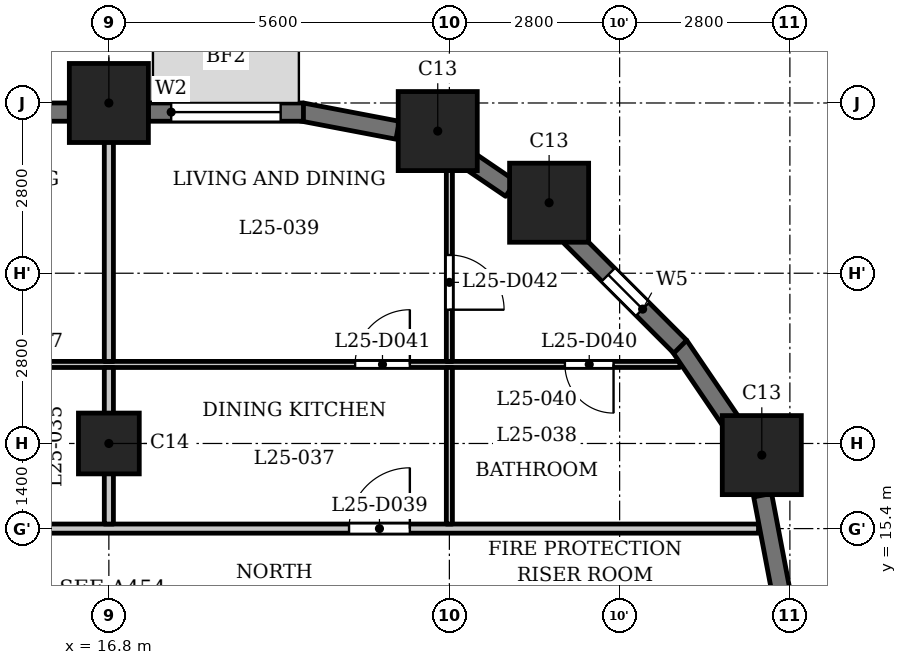
"""IFC4 building model, lengths in metres.
Left out: names, types, materials, properties, quantities, classifications, styles, units other than length and angle.
Written with IfcOpenShell. Run it as: python <this file> out.ifc"""

import sys

from ifc_helpers import new_model, si_unit, direction, frame, frame_2d, origin, origin_2d, place, context, subcontext, project, spatial, rectangle, extrude, element, fill, save


model = new_model("IFC4")
c1 = context("Model", 3, precision=1e-05, world=origin(), true_north=direction((0.0, 1.0)))
c2 = subcontext(c1, "Body", "Model", "MODEL_VIEW")
j1 = project(units=[si_unit("LENGTHUNIT", "METRE"), si_unit("PLANEANGLEUNIT", "RADIAN")], contexts=[c1])
p1 = place(None, origin())
s1 = spatial("IfcSite", under=j1, at=p1, CompositionType="ELEMENT")
p2 = place(p1, origin())
s2 = spatial("IfcBuilding", under=s1, at=p2, CompositionType="ELEMENT")
p3 = place(p2, frame((0.0, 0.0, 100.8)))
s3 = spatial("IfcBuildingStorey", under=s2, at=p3, CompositionType="ELEMENT", Elevation=100.8)
for number, where, z_axis, x_axis in (
    (1, (27.538, 16.609, 0.0), (0.0, 0.0, 1.0), (1.0, 0.0, 0.0)),
    (2, (24.04, 20.76, 0.0), (0.0, 0.0, 1.0), (1.0, 0.0, 0.0)),
    (3, (22.209, 21.938, 0.0), (0.0, 0.0, 1.0), (1.0, 0.0, 0.0)),
    (4, (16.8, 22.4, 0.0), (0.0, 0.0, 1.0), (1.0, 0.0, 0.0)),
):
    element("IfcColumn", number, at=place(p3, frame(where, z_axis=z_axis, x_axis=x_axis)), inside=s3, PredefinedType="COLUMN", context=c2, shape_type="SweptSolid", body=[
        extrude(rectangle(XDim=1.3, YDim=1.3, at=origin_2d()), origin(), (0.0, 0.0, 1.0), 3.5),
    ])
p4 = place(p3, frame((16.8, 16.8, 0.0), z_axis=(0.0, 0.0, 1.0), x_axis=(1.0, 0.0, 0.0)))
e5 = element("IfcColumn", 5, at=p4, inside=s3, PredefinedType="COLUMN", context=c2, shape_type="SweptSolid", body=[
    extrude(rectangle(XDim=1.0, YDim=1.0, at=origin_2d()), origin(), (0.0, 0.0, 1.0), 3.5),
])
for number, where, z_axis, x_axis in (
    (6, (27.853, 14.372, 0.0), (0.0, 0.0, 1.0), (-0.187, 0.982, 0.0)),
    (7, (27.082, 17.084, 0.0), (0.0, 0.0, 1.0), (-0.562, 0.827, 0.0)),
):
    element("IfcWall", number, at=place(p3, frame(where, z_axis=z_axis, x_axis=x_axis)), inside=s3, PredefinedType="SOLIDWALL", context=c2, shape_type="SweptSolid", body=[
        extrude(rectangle(XDim=1.606, YDim=0.3, at=frame_2d((0.803, 0.0))), origin(), (0.0, 0.0, 1.0), 2.4),
    ])
p5 = place(p3, frame((26.197, 18.391, 0.0), z_axis=(0.0, 0.0, 1.0), x_axis=(-0.707058908279, 0.707154650853, 0.0)))
e8 = element("IfcWall", 8, at=p5, inside=s3, PredefinedType="SOLIDWALL", context=c2, shape_type="SweptSolid", body=[
    extrude(rectangle(XDim=2.55, YDim=0.3, at=frame_2d((1.275, 0.0))), origin(), (0.0, 0.0, 1.0), 2.4),
])
p6 = place(p5, frame((0.875, 0.0, 0.6)))
e9 = element("IfcOpeningElement", 9, at=p6, cuts=e8, PredefinedType="OPENING", context=c2, shape_type="SweptSolid", body=[
    extrude(rectangle(XDim=0.8, YDim=1.55, at=frame_2d((0.4, 0.775))), frame((0.0, 0.16, 0.0), z_axis=(0.0, -1.0, 0.0), x_axis=(1.0, 0.0, 0.0)), (0.0, 0.0, 1.0), 0.32),
])
p7 = place(p3, frame((23.41, 20.989, 0.0), z_axis=(0.0, 0.0, 1.0), x_axis=(-0.827050703543, 0.562127328787, 0.0)))
e10 = element("IfcWall", 10, at=p7, inside=s3, PredefinedType="SOLIDWALL", context=c2, shape_type="SweptSolid", body=[
    extrude(rectangle(XDim=0.877, YDim=0.3, at=frame_2d((0.438, 0.0))), origin(), (0.0, 0.0, 1.0), 3.2),
])
p8 = place(p3, frame((21.55, 21.952, 0.0), z_axis=(0.0, 0.0, 1.0), x_axis=(-0.982278644094, 0.187426426519, 0.0)))
e11 = element("IfcWall", 11, at=p8, inside=s3, PredefinedType="SOLIDWALL", context=c2, shape_type="SweptSolid", body=[
    extrude(rectangle(XDim=1.606, YDim=0.3, at=frame_2d((0.803, 0.0))), origin(), (0.0, 0.0, 1.0), 2.4),
])
p9 = place(p3, frame((20.0, 22.25, 0.0), z_axis=(0.0, 0.0, 1.0), x_axis=(-1.0, 0.0, 0.0)))
e12 = element("IfcWall", 12, at=p9, inside=s3, PredefinedType="SOLIDWALL", context=c2, shape_type="SweptSolid", body=[
    extrude(rectangle(XDim=2.55, YDim=0.3, at=frame_2d((1.275, 0.0))), origin(), (0.0, 0.0, 1.0), 2.4),
])
p10 = place(p9, frame((0.375, 0.0, 0.9)))
e13 = element("IfcOpeningElement", 13, at=p10, cuts=e12, PredefinedType="OPENING", context=c2, shape_type="SweptSolid", body=[
    extrude(rectangle(XDim=1.8, YDim=1.25, at=frame_2d((0.9, 0.625))), frame((0.0, 0.16, 0.0), z_axis=(0.0, -1.0, 0.0), x_axis=(1.0, 0.0, 0.0)), (0.0, 0.0, 1.0), 0.32),
])
p11 = place(p3, frame((16.15, 22.25, 0.0), z_axis=(0.0, 0.0, 1.0), x_axis=(-1.0, 0.0, 0.0)))
e14 = element("IfcWall", 14, at=p11, inside=s3, PredefinedType="SOLIDWALL", context=c2, shape_type="SweptSolid", body=[
    extrude(rectangle(XDim=4.3, YDim=0.3, at=frame_2d((2.15, 0.0))), origin(), (0.0, 0.0, 1.0), 2.4),
])
p12 = place(p11, frame((0.35, 0.0, 1.2)))
e15 = element("IfcOpeningElement", 15, at=p12, cuts=e14, PredefinedType="OPENING", context=c2, shape_type="SweptSolid", body=[
    extrude(rectangle(XDim=3.6, YDim=0.95, at=frame_2d((1.8, 0.475))), frame((0.0, 0.16, 0.0), z_axis=(0.0, -1.0, 0.0), x_axis=(1.0, 0.0, 0.0)), (0.0, 0.0, 1.0), 0.32),
])
p13 = place(p3, frame((-27.484, 15.4, 0.0), z_axis=(0.0, 0.0, 1.0), x_axis=(1.0, 0.0, 0.0)))
e16 = element("IfcWall", 16, at=p13, inside=s3, PredefinedType="PARTITIONING", context=c2, shape_type="SweptSolid", body=[
    extrude(rectangle(XDim=54.968, YDim=0.15, at=frame_2d((27.484, 0.0))), origin(), (0.0, 0.0, 1.0), 3.2),
])
p14 = place(p13, frame((9.034, 0.0, 0.0)))
e17 = element("IfcOpeningElement", 17, at=p14, cuts=e16, PredefinedType="OPENING", context=c2, shape_type="SweptSolid", body=[
    extrude(rectangle(XDim=1.0, YDim=2.1, at=frame_2d((0.5, 1.05))), frame((0.0, 0.085, 0.0), z_axis=(0.0, -1.0, 0.0), x_axis=(1.0, 0.0, 0.0)), (0.0, 0.0, 1.0), 0.17),
])
p15 = place(p13, frame((14.634, 0.0, 0.0)))
e18 = element("IfcOpeningElement", 18, at=p15, cuts=e16, PredefinedType="OPENING", context=c2, shape_type="SweptSolid", body=[
    extrude(rectangle(XDim=1.0, YDim=2.1, at=frame_2d((0.5, 1.05))), frame((0.0, 0.085, 0.0), z_axis=(0.0, -1.0, 0.0), x_axis=(1.0, 0.0, 0.0)), (0.0, 0.0, 1.0), 0.17),
])
p16 = place(p13, frame((19.984, 0.0, 0.0)))
e19 = element("IfcOpeningElement", 19, at=p16, cuts=e16, PredefinedType="OPENING", context=c2, shape_type="SweptSolid", body=[
    extrude(rectangle(XDim=1.0, YDim=2.1, at=frame_2d((0.5, 1.05))), frame((0.0, 0.085, 0.0), z_axis=(0.0, -1.0, 0.0), x_axis=(1.0, 0.0, 0.0)), (0.0, 0.0, 1.0), 0.17),
])
p17 = place(p13, frame((23.234, 0.0, 0.0)))
e20 = element("IfcOpeningElement", 20, at=p17, cuts=e16, PredefinedType="OPENING", context=c2, shape_type="SweptSolid", body=[
    extrude(rectangle(XDim=1.0, YDim=2.1, at=frame_2d((0.5, 1.05))), frame((0.0, 0.085, 0.0), z_axis=(0.0, -1.0, 0.0), x_axis=(1.0, 0.0, 0.0)), (0.0, 0.0, 1.0), 0.17),
])
p18 = place(p13, frame((28.184, 0.0, 0.0)))
e21 = element("IfcOpeningElement", 21, at=p18, cuts=e16, PredefinedType="OPENING", context=c2, shape_type="SweptSolid", body=[
    extrude(rectangle(XDim=1.0, YDim=2.1, at=frame_2d((0.5, 1.05))), frame((0.0, 0.085, 0.0), z_axis=(0.0, -1.0, 0.0), x_axis=(1.0, 0.0, 0.0)), (0.0, 0.0, 1.0), 0.17),
])
p19 = place(p13, frame((39.284, 0.0, 0.0)))
e22 = element("IfcOpeningElement", 22, at=p19, cuts=e16, PredefinedType="OPENING", context=c2, shape_type="SweptSolid", body=[
    extrude(rectangle(XDim=1.0, YDim=2.1, at=frame_2d((0.5, 1.05))), frame((0.0, 0.085, 0.0), z_axis=(0.0, -1.0, 0.0), x_axis=(1.0, 0.0, 0.0)), (0.0, 0.0, 1.0), 0.17),
])
p20 = place(p13, frame((48.234, 0.0, 0.0)))
e23 = element("IfcOpeningElement", 23, at=p20, cuts=e16, PredefinedType="OPENING", context=c2, shape_type="SweptSolid", body=[
    extrude(rectangle(XDim=1.0, YDim=2.1, at=frame_2d((0.5, 1.05))), frame((0.0, 0.085, 0.0), z_axis=(0.0, -1.0, 0.0), x_axis=(1.0, 0.0, 0.0)), (0.0, 0.0, 1.0), 0.17),
])
p21 = place(p3, frame((-26.44, 18.1, 0.0), z_axis=(0.0, 0.0, 1.0), x_axis=(1.0, 0.0, 0.0)))
e24 = element("IfcWall", 24, at=p21, inside=s3, PredefinedType="PARTITIONING", context=c2, shape_type="SweptSolid", body=[
    extrude(rectangle(XDim=52.63, YDim=0.1, at=frame_2d((26.315, 0.0))), origin(), (0.0, 0.0, 1.0), 3.2),
])
p22 = place(p21, frame((2.626, 0.0, 0.0)))
e25 = element("IfcOpeningElement", 25, at=p22, cuts=e24, PredefinedType="OPENING", context=c2, shape_type="SweptSolid", body=[
    extrude(rectangle(XDim=0.8, YDim=2.1, at=frame_2d((0.4, 1.05))), frame((0.0, 0.06, 0.0), z_axis=(0.0, -1.0, 0.0), x_axis=(1.0, 0.0, 0.0)), (0.0, 0.0, 1.0), 0.12),
])
p23 = place(p21, frame((8.09, 0.0, 0.0)))
e26 = element("IfcOpeningElement", 26, at=p23, cuts=e24, PredefinedType="OPENING", context=c2, shape_type="SweptSolid", body=[
    extrude(rectangle(XDim=0.9, YDim=2.1, at=frame_2d((0.45, 1.05))), frame((0.0, 0.06, 0.0), z_axis=(0.0, -1.0, 0.0), x_axis=(1.0, 0.0, 0.0)), (0.0, 0.0, 1.0), 0.12),
])
p24 = place(p21, frame((10.29, 0.0, 0.0)))
e27 = element("IfcOpeningElement", 27, at=p24, cuts=e24, PredefinedType="OPENING", context=c2, shape_type="SweptSolid", body=[
    extrude(rectangle(XDim=0.8, YDim=2.1, at=frame_2d((0.4, 1.05))), frame((0.0, 0.06, 0.0), z_axis=(0.0, -1.0, 0.0), x_axis=(1.0, 0.0, 0.0)), (0.0, 0.0, 1.0), 0.12),
])
p25 = place(p21, frame((13.69, 0.0, 0.0)))
e28 = element("IfcOpeningElement", 28, at=p25, cuts=e24, PredefinedType="OPENING", context=c2, shape_type="SweptSolid", body=[
    extrude(rectangle(XDim=0.9, YDim=2.1, at=frame_2d((0.45, 1.05))), frame((0.0, 0.06, 0.0), z_axis=(0.0, -1.0, 0.0), x_axis=(1.0, 0.0, 0.0)), (0.0, 0.0, 1.0), 0.12),
])
p26 = place(p21, frame((15.89, 0.0, 0.0)))
e29 = element("IfcOpeningElement", 29, at=p26, cuts=e24, PredefinedType="OPENING", context=c2, shape_type="SweptSolid", body=[
    extrude(rectangle(XDim=0.8, YDim=2.1, at=frame_2d((0.4, 1.05))), frame((0.0, 0.06, 0.0), z_axis=(0.0, -1.0, 0.0), x_axis=(1.0, 0.0, 0.0)), (0.0, 0.0, 1.0), 0.12),
])
p27 = place(p21, frame((19.04, 0.0, 0.0)))
e30 = element("IfcOpeningElement", 30, at=p27, cuts=e24, PredefinedType="OPENING", context=c2, shape_type="SweptSolid", body=[
    extrude(rectangle(XDim=0.9, YDim=2.1, at=frame_2d((0.45, 1.05))), frame((0.0, 0.06, 0.0), z_axis=(0.0, -1.0, 0.0), x_axis=(1.0, 0.0, 0.0)), (0.0, 0.0, 1.0), 0.12),
])
p28 = place(p21, frame((24.99, 0.0, 0.0)))
e31 = element("IfcOpeningElement", 31, at=p28, cuts=e24, PredefinedType="OPENING", context=c2, shape_type="SweptSolid", body=[
    extrude(rectangle(XDim=0.8, YDim=2.1, at=frame_2d((0.4, 1.05))), frame((0.0, 0.06, 0.0), z_axis=(0.0, -1.0, 0.0), x_axis=(1.0, 0.0, 0.0)), (0.0, 0.0, 1.0), 0.12),
])
p29 = place(p21, frame((22.29, 0.0, 0.0)))
e32 = element("IfcOpeningElement", 32, at=p29, cuts=e24, PredefinedType="OPENING", context=c2, shape_type="SweptSolid", body=[
    extrude(rectangle(XDim=0.9, YDim=2.1, at=frame_2d((0.45, 1.05))), frame((0.0, 0.06, 0.0), z_axis=(0.0, -1.0, 0.0), x_axis=(1.0, 0.0, 0.0)), (0.0, 0.0, 1.0), 0.12),
])
p30 = place(p21, frame((32.69, 0.0, 0.0)))
e33 = element("IfcOpeningElement", 33, at=p30, cuts=e24, PredefinedType="OPENING", context=c2, shape_type="SweptSolid", body=[
    extrude(rectangle(XDim=0.8, YDim=2.1, at=frame_2d((0.4, 1.05))), frame((0.0, 0.06, 0.0), z_axis=(0.0, -1.0, 0.0), x_axis=(1.0, 0.0, 0.0)), (0.0, 0.0, 1.0), 0.12),
])
p31 = place(p21, frame((26.99, 0.0, 0.0)))
e34 = element("IfcOpeningElement", 34, at=p31, cuts=e24, PredefinedType="OPENING", context=c2, shape_type="SweptSolid", body=[
    extrude(rectangle(XDim=0.9, YDim=2.1, at=frame_2d((0.45, 1.05))), frame((0.0, 0.06, 0.0), z_axis=(0.0, -1.0, 0.0), x_axis=(1.0, 0.0, 0.0)), (0.0, 0.0, 1.0), 0.12),
])
p32 = place(p21, frame((41.29, 0.0, 0.0)))
e35 = element("IfcOpeningElement", 35, at=p32, cuts=e24, PredefinedType="OPENING", context=c2, shape_type="SweptSolid", body=[
    extrude(rectangle(XDim=0.8, YDim=2.1, at=frame_2d((0.4, 1.05))), frame((0.0, 0.06, 0.0), z_axis=(0.0, -1.0, 0.0), x_axis=(1.0, 0.0, 0.0)), (0.0, 0.0, 1.0), 0.12),
])
p33 = place(p21, frame((38.34, 0.0, 0.0)))
e36 = element("IfcOpeningElement", 36, at=p33, cuts=e24, PredefinedType="OPENING", context=c2, shape_type="SweptSolid", body=[
    extrude(rectangle(XDim=0.9, YDim=2.1, at=frame_2d((0.45, 1.05))), frame((0.0, 0.06, 0.0), z_axis=(0.0, -1.0, 0.0), x_axis=(1.0, 0.0, 0.0)), (0.0, 0.0, 1.0), 0.12),
])
p34 = place(p21, frame((50.74, 0.0, 0.0)))
e37 = element("IfcOpeningElement", 37, at=p34, cuts=e24, PredefinedType="OPENING", context=c2, shape_type="SweptSolid", body=[
    extrude(rectangle(XDim=0.8, YDim=2.1, at=frame_2d((0.4, 1.05))), frame((0.0, 0.06, 0.0), z_axis=(0.0, -1.0, 0.0), x_axis=(1.0, 0.0, 0.0)), (0.0, 0.0, 1.0), 0.12),
])
p35 = place(p21, frame((47.29, 0.0, 0.0)))
e38 = element("IfcOpeningElement", 38, at=p35, cuts=e24, PredefinedType="OPENING", context=c2, shape_type="SweptSolid", body=[
    extrude(rectangle(XDim=0.9, YDim=2.1, at=frame_2d((0.45, 1.05))), frame((0.0, 0.06, 0.0), z_axis=(0.0, -1.0, 0.0), x_axis=(1.0, 0.0, 0.0)), (0.0, 0.0, 1.0), 0.12),
])
p36 = place(p3, frame((16.8, 15.475, 0.0), z_axis=(0.0, 0.0, 1.0), x_axis=(0.0, 1.0, 0.0)))
e39 = element("IfcWall", 39, at=p36, inside=s3, PredefinedType="PARTITIONING", context=c2, shape_type="SweptSolid", body=[
    extrude(rectangle(XDim=2.575, YDim=0.15, at=frame_2d((1.288, 0.0))), origin(), (0.0, 0.0, 1.0), 3.2),
])
p37 = place(p3, frame((16.8, 18.15, 0.0), z_axis=(0.0, 0.0, 1.0), x_axis=(0.0, 1.0, 0.0)))
e40 = element("IfcWall", 40, at=p37, inside=s3, PredefinedType="PARTITIONING", context=c2, shape_type="SweptSolid", body=[
    extrude(rectangle(XDim=4.88, YDim=0.15, at=frame_2d((2.44, 0.0))), origin(), (0.0, 0.0, 1.0), 3.2),
])
p38 = place(p3, frame((22.4, 15.475, 0.0), z_axis=(0.0, 0.0, 1.0), x_axis=(0.0, 1.0, 0.0)))
e41 = element("IfcWall", 41, at=p38, inside=s3, PredefinedType="PARTITIONING", context=c2, shape_type="SweptSolid", body=[
    extrude(rectangle(XDim=2.575, YDim=0.1, at=frame_2d((1.288, 0.0))), origin(), (0.0, 0.0, 1.0), 3.2),
])
p39 = place(p3, frame((22.4, 18.15, 0.0), z_axis=(0.0, 0.0, 1.0), x_axis=(0.0, 1.0, 0.0)))
e42 = element("IfcWall", 42, at=p39, inside=s3, PredefinedType="PARTITIONING", context=c2, shape_type="SweptSolid", body=[
    extrude(rectangle(XDim=3.57, YDim=0.1, at=frame_2d((1.785, 0.0))), origin(), (0.0, 0.0, 1.0), 3.2),
])
p40 = place(p39, frame((0.85, 0.0, 0.0)))
e43 = element("IfcOpeningElement", 43, at=p40, cuts=e42, PredefinedType="OPENING", context=c2, shape_type="SweptSolid", body=[
    extrude(rectangle(XDim=0.9, YDim=2.1, at=frame_2d((0.45, 1.05))), frame((0.0, 0.06, 0.0), z_axis=(0.0, -1.0, 0.0), x_axis=(1.0, 0.0, 0.0)), (0.0, 0.0, 1.0), 0.12),
])
p41 = place(p20, origin())
e44 = element("IfcDoor", 44, at=p41, inside=s3, OperationType="SINGLE_SWING_LEFT", PredefinedType="DOOR", context=c2, shape_type="SweptSolid", body=[
    extrude(rectangle(XDim=1.0, YDim=2.1, at=frame_2d((0.5, 1.05))), frame((0.0, 0.025, 0.0), z_axis=(0.0, -1.0, 0.0), x_axis=(1.0, 0.0, 0.0)), (0.0, 0.0, 1.0), 0.05),
])
fill(e23, e44)
p42 = place(p34, origin())
e45 = element("IfcDoor", 45, at=p42, inside=s3, OperationType="SINGLE_SWING_RIGHT", PredefinedType="DOOR", context=c2, shape_type="SweptSolid", body=[
    extrude(rectangle(XDim=0.8, YDim=2.1, at=frame_2d((0.4, 1.05))), frame((0.0, 0.025, 0.0), z_axis=(0.0, -1.0, 0.0), x_axis=(1.0, 0.0, 0.0)), (0.0, 0.0, 1.0), 0.05),
])
fill(e37, e45)
p43 = place(p35, origin())
e46 = element("IfcDoor", 46, at=p43, inside=s3, OperationType="SINGLE_SWING_LEFT", PredefinedType="DOOR", context=c2, shape_type="SweptSolid", body=[
    extrude(rectangle(XDim=0.9, YDim=2.1, at=frame_2d((0.45, 1.05))), frame((0.0, 0.025, 0.0), z_axis=(0.0, -1.0, 0.0), x_axis=(1.0, 0.0, 0.0)), (0.0, 0.0, 1.0), 0.05),
])
fill(e38, e46)
p44 = place(p40, origin())
e47 = element("IfcDoor", 47, at=p44, inside=s3, OperationType="SINGLE_SWING_LEFT", PredefinedType="DOOR", context=c2, shape_type="SweptSolid", body=[
    extrude(rectangle(XDim=0.9, YDim=2.1, at=frame_2d((0.45, 1.05))), frame((0.0, 0.025, 0.0), z_axis=(0.0, -1.0, 0.0), x_axis=(1.0, 0.0, 0.0)), (0.0, 0.0, 1.0), 0.05),
])
fill(e43, e47)
p45 = place(p6, origin())
e48 = element("IfcWindow", 48, at=p45, inside=s3, PartitioningType="SINGLE_PANEL", PredefinedType="WINDOW", context=c2, shape_type="SweptSolid", body=[
    extrude(rectangle(XDim=0.8, YDim=1.55, at=frame_2d((0.4, 0.775))), frame((0.0, 0.03, 0.0), z_axis=(0.0, -1.0, 0.0), x_axis=(1.0, 0.0, 0.0)), (0.0, 0.0, 1.0), 0.06),
])
fill(e9, e48)
p46 = place(p10, origin())
e49 = element("IfcWindow", 49, at=p46, inside=s3, PartitioningType="SINGLE_PANEL", PredefinedType="WINDOW", context=c2, shape_type="SweptSolid", body=[
    extrude(rectangle(XDim=1.8, YDim=1.25, at=frame_2d((0.9, 0.625))), frame((0.0, 0.03, 0.0), z_axis=(0.0, -1.0, 0.0), x_axis=(1.0, 0.0, 0.0)), (0.0, 0.0, 1.0), 0.06),
])
fill(e13, e49)
save(model, sys.argv[1])
